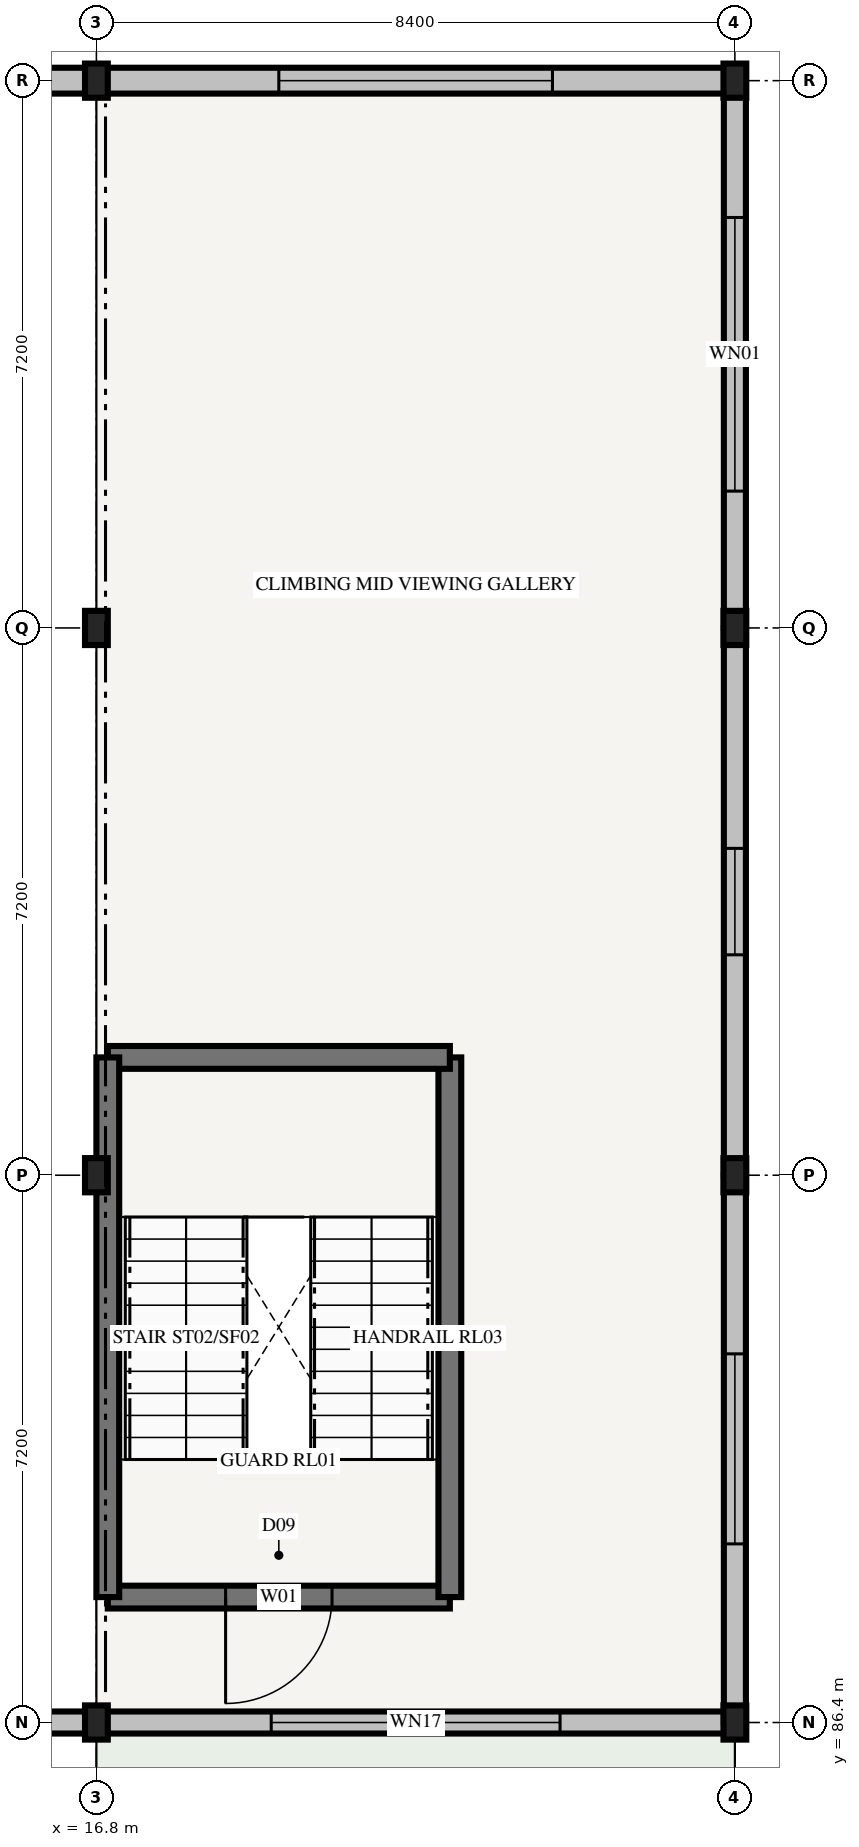
"""IFC4 building model, lengths in metres.
Left out: names, types, materials, properties, quantities, classifications, styles, units other than length and angle.
Written with IfcOpenShell. Run it as: python <this file> out.ifc"""

import sys

from ifc_helpers import new_model, si_unit, direction, frame, frame_2d, origin, origin_2d, place, context, subcontext, project, spatial, rectangle, i_section, extrude, element, fill, save


model = new_model("IFC4")
c1 = context("Model", 3, precision=1e-05, world=origin(), true_north=direction((0.0, 1.0)))
c2 = subcontext(c1, "Body", "Model", "MODEL_VIEW")
j1 = project(units=[si_unit("LENGTHUNIT", "METRE"), si_unit("PLANEANGLEUNIT", "RADIAN")], contexts=[c1])
p1 = place(None, origin())
s1 = spatial("IfcSite", under=j1, at=p1, CompositionType="ELEMENT")
p2 = place(p1, origin())
s2 = spatial("IfcBuilding", under=s1, at=p2, CompositionType="ELEMENT")
p3 = place(p2, frame((0.0, 0.0, 8.7)))
s3 = spatial("IfcBuildingStorey", under=s2, at=p3, CompositionType="ELEMENT", Elevation=8.7)
for number, where, z_axis, x_axis in (
    (1, (16.8, 86.4, 0.0), (0.0, 0.0, 1.0), (1.0, 0.0, 0.0)),
    (2, (16.8, 93.6, 0.0), (0.0, 0.0, 1.0), (1.0, 0.0, 0.0)),
    (3, (16.8, 100.8, 0.0), (0.0, 0.0, 1.0), (1.0, 0.0, 0.0)),
    (4, (16.8, 108.0, 0.0), (0.0, 0.0, 1.0), (1.0, 0.0, 0.0)),
    (5, (25.2, 86.4, 0.0), (0.0, 0.0, 1.0), (1.0, 0.0, 0.0)),
    (6, (25.2, 93.6, 0.0), (0.0, 0.0, 1.0), (1.0, 0.0, 0.0)),
    (7, (25.2, 100.8, 0.0), (0.0, 0.0, 1.0), (1.0, 0.0, 0.0)),
    (8, (25.2, 108.0, 0.0), (0.0, 0.0, 1.0), (1.0, 0.0, 0.0)),
):
    element("IfcColumn", number, at=place(p3, frame(where, z_axis=z_axis, x_axis=x_axis)), inside=s3, PredefinedType="COLUMN", context=c2, shape_type="SweptSolid", body=[
        extrude(i_section(OverallWidth=0.3, OverallDepth=0.45, WebThickness=0.014, FlangeThickness=0.026, FilletRadius=0.027, at=origin_2d()), origin(), (0.0, 0.0, 1.0), 4.2),
    ])
p4 = place(p3, frame((16.8, 108.0, 0.0), z_axis=(0.0, 0.0, 1.0), x_axis=(-1.0, 0.0, 0.0)))
e9 = element("IfcWall", 9, at=p4, inside=s3, PredefinedType="STANDARD", context=c2, shape_type="SweptSolid", body=[
    extrude(rectangle(XDim=8.4, YDim=0.34, at=frame_2d((4.2, 0.0))), origin(), (0.0, 0.0, 1.0), 3.595),
])
p5 = place(p4, frame((2.4, 0.0, 1.6)))
e10 = element("IfcOpeningElement", 10, at=p5, cuts=e9, PredefinedType="OPENING", context=c2, shape_type="SweptSolid", body=[
    extrude(rectangle(XDim=3.6, YDim=1.5, at=frame_2d((1.8, 0.75))), frame((0.0, 0.195, 0.0), z_axis=(0.0, -1.0, 0.0), x_axis=(1.0, 0.0, 0.0)), (0.0, 0.0, 1.0), 0.39),
])
p6 = place(p3, frame((8.4, 86.4, 0.0), z_axis=(0.0, 0.0, 1.0), x_axis=(1.0, 0.0, 0.0)))
e11 = element("IfcWall", 11, at=p6, inside=s3, PredefinedType="STANDARD", context=c2, shape_type="SweptSolid", body=[
    extrude(rectangle(XDim=8.4, YDim=0.29, at=frame_2d((4.2, 0.0))), origin(), (0.0, 0.0, 1.0), 3.385),
])
p7 = place(p6, frame((3.0, 0.0, 0.805)))
e12 = element("IfcOpeningElement", 12, at=p7, cuts=e11, PredefinedType="OPENING", context=c2, shape_type="SweptSolid", body=[
    extrude(rectangle(XDim=2.4, YDim=2.4, at=frame_2d((1.2, 1.2))), frame((0.0, 0.17, 0.0), z_axis=(0.0, -1.0, 0.0), x_axis=(1.0, 0.0, 0.0)), (0.0, 0.0, 1.0), 0.34),
])
p8 = place(p3, frame((16.8, 86.4, 0.0), z_axis=(0.0, 0.0, 1.0), x_axis=(1.0, 0.0, 0.0)))
e13 = element("IfcWall", 13, at=p8, inside=s3, PredefinedType="STANDARD", context=c2, shape_type="SweptSolid", body=[
    extrude(rectangle(XDim=8.4, YDim=0.29, at=frame_2d((4.2, 0.0))), origin(), (0.0, 0.0, 1.0), 3.385),
])
p9 = place(p8, frame((2.3, 0.0, 0.85)))
e14 = element("IfcOpeningElement", 14, at=p9, cuts=e13, PredefinedType="OPENING", context=c2, shape_type="SweptSolid", body=[
    extrude(rectangle(XDim=3.8, YDim=2.1, at=frame_2d((1.9, 1.05))), frame((0.0, 0.17, 0.0), z_axis=(0.0, -1.0, 0.0), x_axis=(1.0, 0.0, 0.0)), (0.0, 0.0, 1.0), 0.34),
])
p10 = place(p3, frame((25.2, 86.4, 0.0), z_axis=(0.0, 0.0, 1.0), x_axis=(0.0, 1.0, 0.0)))
e15 = element("IfcWall", 15, at=p10, inside=s3, PredefinedType="STANDARD", context=c2, shape_type="SweptSolid", body=[
    extrude(rectangle(XDim=7.2, YDim=0.29, at=frame_2d((3.6, 0.0))), origin(), (0.0, 0.0, 1.0), 3.385),
])
p11 = place(p10, frame((2.35, 0.0, 0.85)))
e16 = element("IfcOpeningElement", 16, at=p11, cuts=e15, PredefinedType="OPENING", context=c2, shape_type="SweptSolid", body=[
    extrude(rectangle(XDim=2.5, YDim=1.65, at=frame_2d((1.25, 0.825))), frame((0.0, 0.17, 0.0), z_axis=(0.0, -1.0, 0.0), x_axis=(1.0, 0.0, 0.0)), (0.0, 0.0, 1.0), 0.34),
])
p12 = place(p3, frame((25.2, 93.6, 0.0), z_axis=(0.0, 0.0, 1.0), x_axis=(0.0, 1.0, 0.0)))
e17 = element("IfcWall", 17, at=p12, inside=s3, PredefinedType="STANDARD", context=c2, shape_type="SweptSolid", body=[
    extrude(rectangle(XDim=7.2, YDim=0.29, at=frame_2d((3.6, 0.0))), origin(), (0.0, 0.0, 1.0), 3.485),
])
p13 = place(p12, frame((2.9, 0.0, 0.85)))
e18 = element("IfcOpeningElement", 18, at=p13, cuts=e17, PredefinedType="OPENING", context=c2, shape_type="SweptSolid", body=[
    extrude(rectangle(XDim=1.4, YDim=1.2, at=frame_2d((0.7, 0.6))), frame((0.0, 0.17, 0.0), z_axis=(0.0, -1.0, 0.0), x_axis=(1.0, 0.0, 0.0)), (0.0, 0.0, 1.0), 0.34),
])
p14 = place(p3, frame((25.2, 100.8, 0.0), z_axis=(0.0, 0.0, 1.0), x_axis=(0.0, 1.0, 0.0)))
e19 = element("IfcWall", 19, at=p14, inside=s3, PredefinedType="STANDARD", context=c2, shape_type="SweptSolid", body=[
    extrude(rectangle(XDim=7.2, YDim=0.29, at=frame_2d((3.6, 0.0))), origin(), (0.0, 0.0, 1.0), 3.485),
])
p15 = place(p14, frame((1.8, 0.0, 0.85)))
e20 = element("IfcOpeningElement", 20, at=p15, cuts=e19, PredefinedType="OPENING", context=c2, shape_type="SweptSolid", body=[
    extrude(rectangle(XDim=3.6, YDim=2.4, at=frame_2d((1.8, 1.2))), frame((0.0, 0.17, 0.0), z_axis=(0.0, -1.0, 0.0), x_axis=(1.0, 0.0, 0.0)), (0.0, 0.0, 1.0), 0.34),
])
p16 = place(p3, frame((25.2, 108.0, 0.0), z_axis=(0.0, 0.0, 1.0), x_axis=(-1.0, 0.0, 0.0)))
e21 = element("IfcWall", 21, at=p16, inside=s3, PredefinedType="STANDARD", context=c2, shape_type="SweptSolid", body=[
    extrude(rectangle(XDim=8.4, YDim=0.34, at=frame_2d((4.2, 0.0))), origin(), (0.0, 0.0, 1.0), 3.485),
])
p17 = place(p16, frame((2.4, 0.0, 1.6)))
e22 = element("IfcOpeningElement", 22, at=p17, cuts=e21, PredefinedType="OPENING", context=c2, shape_type="SweptSolid", body=[
    extrude(rectangle(XDim=3.6, YDim=1.5, at=frame_2d((1.8, 0.75))), frame((0.0, 0.195, 0.0), z_axis=(0.0, -1.0, 0.0), x_axis=(1.0, 0.0, 0.0)), (0.0, 0.0, 1.0), 0.39),
])
p18 = place(p3, frame((16.95, 88.05, 0.0), z_axis=(0.0, 0.0, 1.0), x_axis=(1.0, 0.0, 0.0)))
e23 = element("IfcWall", 23, at=p18, inside=s3, PredefinedType="SHEAR", context=c2, shape_type="SweptSolid", body=[
    extrude(rectangle(XDim=4.5, YDim=0.3, at=frame_2d((2.25, 0.0))), origin(), (0.0, 0.0, 1.0), 4.0),
])
p19 = place(p18, frame((1.55, 0.0, 0.0)))
e24 = element("IfcOpeningElement", 24, at=p19, cuts=e23, PredefinedType="OPENING", context=c2, shape_type="SweptSolid", body=[
    extrude(rectangle(XDim=1.4, YDim=2.2, at=frame_2d((0.7, 1.1))), frame((0.0, 0.175, 0.0), z_axis=(0.0, -1.0, 0.0), x_axis=(1.0, 0.0, 0.0)), (0.0, 0.0, 1.0), 0.35),
])
p20 = place(p3, frame((21.45, 88.05, 0.0), z_axis=(0.0, 0.0, 1.0), x_axis=(0.0, 1.0, 0.0)))
e25 = element("IfcWall", 25, at=p20, inside=s3, PredefinedType="SHEAR", context=c2, shape_type="SweptSolid", body=[
    extrude(rectangle(XDim=7.1, YDim=0.3, at=frame_2d((3.55, 0.0))), origin(), (0.0, 0.0, 1.0), 4.0),
])
p21 = place(p3, frame((21.45, 95.15, 0.0), z_axis=(0.0, 0.0, 1.0), x_axis=(-1.0, 0.0, 0.0)))
e26 = element("IfcWall", 26, at=p21, inside=s3, PredefinedType="SHEAR", context=c2, shape_type="SweptSolid", body=[
    extrude(rectangle(XDim=4.5, YDim=0.3, at=frame_2d((2.25, 0.0))), origin(), (0.0, 0.0, 1.0), 4.0),
])
p22 = place(p3, frame((16.95, 95.15, 0.0), z_axis=(0.0, 0.0, 1.0), x_axis=(0.0, -1.0, 0.0)))
e27 = element("IfcWall", 27, at=p22, inside=s3, PredefinedType="SHEAR", context=c2, shape_type="SweptSolid", body=[
    extrude(rectangle(XDim=7.1, YDim=0.3, at=frame_2d((3.55, 0.0))), origin(), (0.0, 0.0, 1.0), 4.0),
])
p23 = place(p9, origin())
e28 = element("IfcWindow", 28, at=p23, inside=s3, PartitioningType="SINGLE_PANEL", PredefinedType="WINDOW", context=c2, shape_type="SweptSolid", body=[
    extrude(rectangle(XDim=3.8, YDim=2.1, at=frame_2d((1.9, 1.05))), frame((0.0, 0.03, 0.0), z_axis=(0.0, -1.0, 0.0), x_axis=(1.0, 0.0, 0.0)), (0.0, 0.0, 1.0), 0.06),
])
fill(e14, e28)
p24 = place(p11, origin())
e29 = element("IfcWindow", 29, at=p24, inside=s3, PartitioningType="SINGLE_PANEL", PredefinedType="WINDOW", context=c2, shape_type="SweptSolid", body=[
    extrude(rectangle(XDim=2.5, YDim=1.65, at=frame_2d((1.25, 0.825))), frame((0.0, 0.03, 0.0), z_axis=(0.0, -1.0, 0.0), x_axis=(1.0, 0.0, 0.0)), (0.0, 0.0, 1.0), 0.06),
])
fill(e16, e29)
p25 = place(p13, origin())
e30 = element("IfcWindow", 30, at=p25, inside=s3, PartitioningType="SINGLE_PANEL", PredefinedType="WINDOW", context=c2, shape_type="SweptSolid", body=[
    extrude(rectangle(XDim=1.4, YDim=1.2, at=frame_2d((0.7, 0.6))), frame((0.0, 0.03, 0.0), z_axis=(0.0, -1.0, 0.0), x_axis=(1.0, 0.0, 0.0)), (0.0, 0.0, 1.0), 0.06),
])
fill(e18, e30)
p26 = place(p15, origin())
e31 = element("IfcWindow", 31, at=p26, inside=s3, PartitioningType="SINGLE_PANEL", PredefinedType="WINDOW", context=c2, shape_type="SweptSolid", body=[
    extrude(rectangle(XDim=3.6, YDim=2.4, at=frame_2d((1.8, 1.2))), frame((0.0, 0.03, 0.0), z_axis=(0.0, -1.0, 0.0), x_axis=(1.0, 0.0, 0.0)), (0.0, 0.0, 1.0), 0.06),
])
fill(e20, e31)
p27 = place(p17, origin())
e32 = element("IfcWindow", 32, at=p27, inside=s3, PartitioningType="SINGLE_PANEL", PredefinedType="WINDOW", context=c2, shape_type="SweptSolid", body=[
    extrude(rectangle(XDim=3.6, YDim=1.5, at=frame_2d((1.8, 0.75))), frame((0.0, 0.03, 0.0), z_axis=(0.0, -1.0, 0.0), x_axis=(1.0, 0.0, 0.0)), (0.0, 0.0, 1.0), 0.06),
])
fill(e22, e32)
p28 = place(p19, frame((1.4, 0.0, 0.0), z_axis=(0.0, 0.0, 1.0), x_axis=(-1.0, 0.0, 0.0)))
e33 = element("IfcDoor", 33, at=p28, inside=s3, OperationType="SINGLE_SWING_RIGHT", PredefinedType="DOOR", context=c2, shape_type="SweptSolid", body=[
    extrude(rectangle(XDim=1.4, YDim=2.2, at=frame_2d((0.7, 1.1))), frame((0.0, 0.025, 0.0), z_axis=(0.0, -1.0, 0.0), x_axis=(1.0, 0.0, 0.0)), (0.0, 0.0, 1.0), 0.05),
])
fill(e24, e33)
save(model, sys.argv[1])
